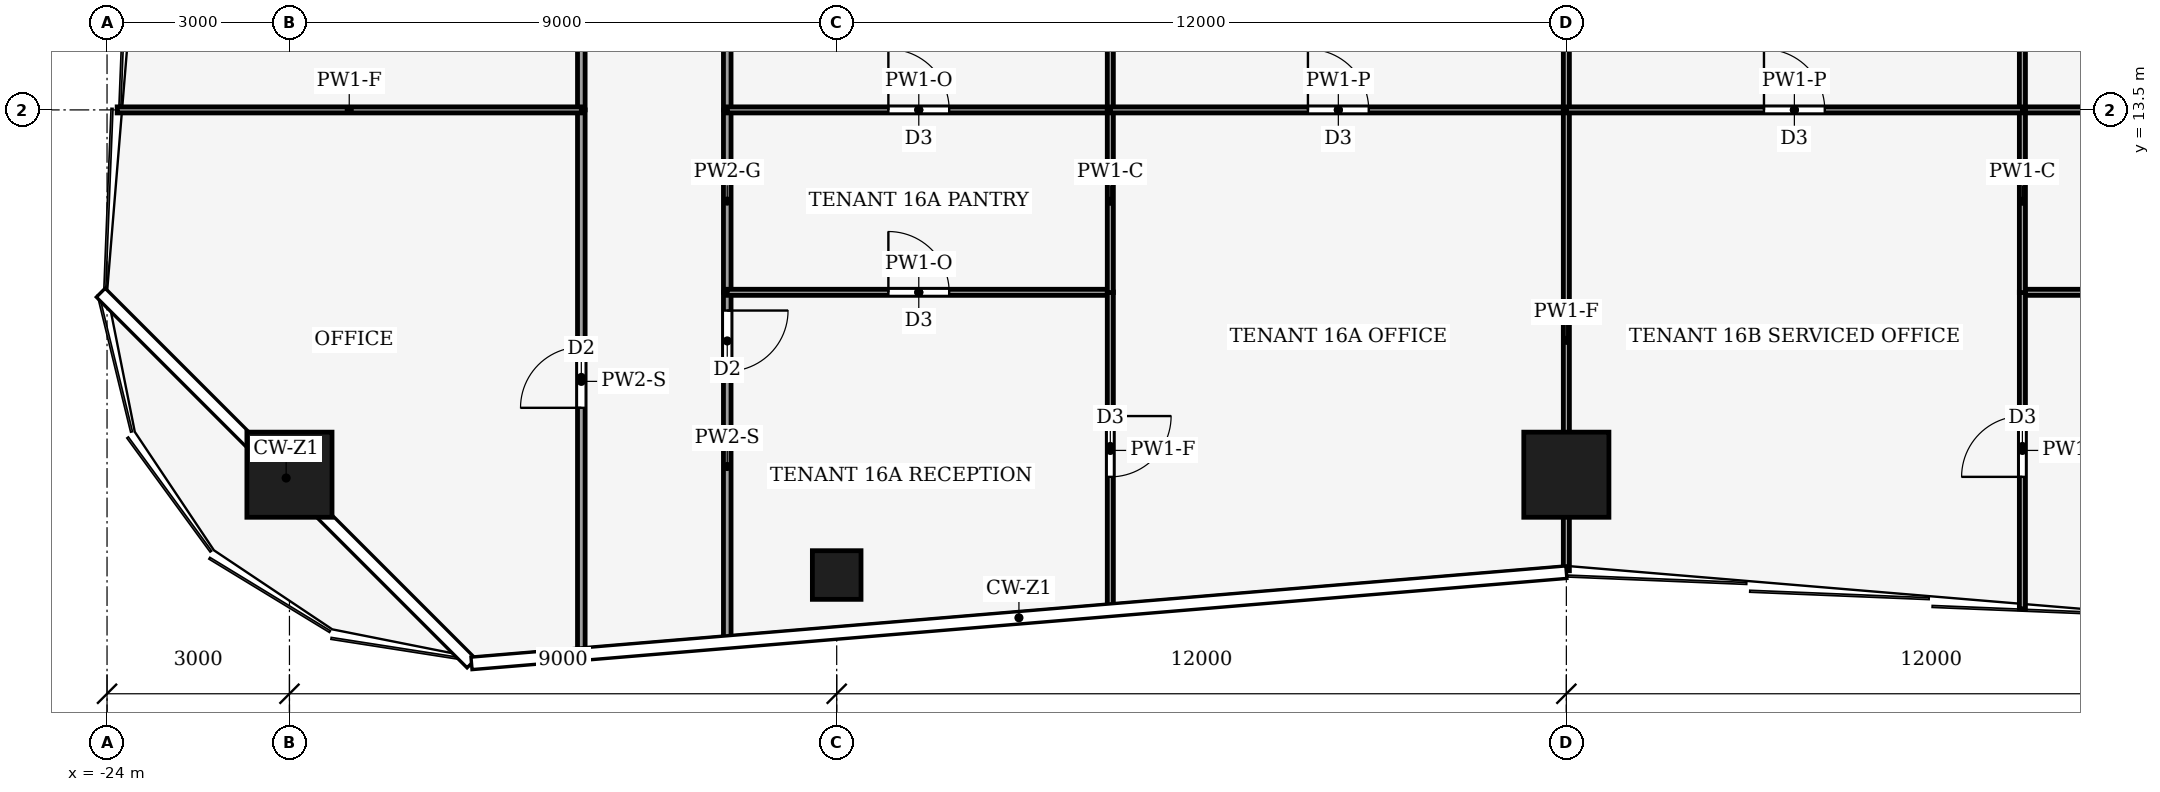
"""IFC4 building model, lengths in metres.
Left out: names, types, materials, properties, quantities, classifications, styles, units other than length and angle.
Written with IfcOpenShell. Run it as: python <this file> out.ifc"""

import sys

from ifc_helpers import new_model, si_unit, direction, frame, frame_2d, origin, origin_2d, place, context, subcontext, project, spatial, rectangle, hollow_rectangle, extrude, element, fill, save


model = new_model("IFC4")
c1 = context("Model", 3, precision=1e-05, world=origin(), true_north=direction((0.0, 1.0)))
c2 = subcontext(c1, "Body", "Model", "MODEL_VIEW")
j1 = project(units=[si_unit("LENGTHUNIT", "METRE"), si_unit("PLANEANGLEUNIT", "RADIAN")], contexts=[c1])
p1 = place(None, origin())
s1 = spatial("IfcSite", under=j1, at=p1, CompositionType="ELEMENT")
p2 = place(p1, origin())
s2 = spatial("IfcBuilding", under=s1, at=p2, CompositionType="ELEMENT")
p3 = place(p2, frame((0.0, 0.0, 74.0)))
s3 = spatial("IfcBuildingStorey", under=s2, at=p3, CompositionType="ELEMENT", Elevation=74.0)
for number, where, z_axis, x_axis in (
    (1, (0.0, 7.5, 0.0), (0.0, 0.0, 1.0), (1.0, 0.0, 0.0)),
    (2, (-21.0, 7.5, 0.0), (0.0, 0.0, 1.0), (1.0, 0.0, 0.0)),
):
    element("IfcColumn", number, at=place(p3, frame(where, z_axis=z_axis, x_axis=x_axis)), inside=s3, PredefinedType="COLUMN", context=c2, shape_type="SweptSolid", body=[
        extrude(hollow_rectangle(XDim=1.4, YDim=1.4, WallThickness=0.08, at=origin_2d()), origin(), (0.0, 0.0, 1.0), 4.0),
    ])
p4 = place(p3, frame((-12.0, 5.85, 0.0), z_axis=(0.0, 0.0, 1.0), x_axis=(1.0, 0.0, 0.0)))
e3 = element("IfcColumn", 3, at=p4, inside=s3, PredefinedType="COLUMN", context=c2, shape_type="SweptSolid", body=[
    extrude(hollow_rectangle(XDim=0.8, YDim=0.8, WallThickness=0.04, at=origin_2d()), origin(), (0.0, 0.0, 1.0), 4.0),
])
p5 = place(p3, frame((-16.2, 4.57, 0.0), z_axis=(0.0, 0.0, 1.0), x_axis=(0.0, 1.0, 0.0)))
e4 = element("IfcWall", 4, at=p5, inside=s3, PredefinedType="PARTITIONING", context=c2, shape_type="SweptSolid", body=[
    extrude(rectangle(XDim=8.93, YDim=0.125, at=frame_2d((4.465, 0.0))), origin(), (0.0, 0.0, 1.0), 3.04),
])
p6 = place(p5, frame((4.03, 0.0, 0.0)))
e5 = element("IfcOpeningElement", 5, at=p6, cuts=e4, PredefinedType="OPENING", context=c2, shape_type="SweptSolid", body=[
    extrude(rectangle(XDim=1.0, YDim=2.1, at=frame_2d((0.5, 1.05))), frame((0.0, 0.073, 0.0), z_axis=(0.0, -1.0, 0.0), x_axis=(1.0, 0.0, 0.0)), (0.0, 0.0, 1.0), 0.145),
])
p7 = place(p3, frame((-16.2, 13.5, 0.0), z_axis=(0.0, 0.0, 1.0), x_axis=(0.0, 1.0, 0.0)))
e6 = element("IfcWall", 6, at=p7, inside=s3, PredefinedType="PARTITIONING", context=c2, shape_type="SweptSolid", body=[
    extrude(rectangle(XDim=6.0, YDim=0.125, at=frame_2d((3.0, 0.0))), origin(), (0.0, 0.0, 1.0), 3.14),
])
p8 = place(p7, frame((2.5, 0.0, 0.0)))
e7 = element("IfcOpeningElement", 7, at=p8, cuts=e6, PredefinedType="OPENING", context=c2, shape_type="SweptSolid", body=[
    extrude(rectangle(XDim=1.0, YDim=2.1, at=frame_2d((0.5, 1.05))), frame((0.0, 0.073, 0.0), z_axis=(0.0, -1.0, 0.0), x_axis=(1.0, 0.0, 0.0)), (0.0, 0.0, 1.0), 0.145),
])
p9 = place(p3, frame((-13.8, 10.5, 0.0), z_axis=(0.0, 0.0, 1.0), x_axis=(0.0, -1.0, 0.0)))
e8 = element("IfcWall", 8, at=p9, inside=s3, PredefinedType="PARTITIONING", context=c2, shape_type="SweptSolid", body=[
    extrude(rectangle(XDim=5.73, YDim=0.125, at=frame_2d((2.865, 0.0))), origin(), (0.0, 0.0, 1.0), 3.04),
])
p10 = place(p9, frame((0.3, 0.0, 0.0)))
e9 = element("IfcOpeningElement", 9, at=p10, cuts=e8, PredefinedType="OPENING", context=c2, shape_type="SweptSolid", body=[
    extrude(rectangle(XDim=1.0, YDim=2.1, at=frame_2d((0.5, 1.05))), frame((0.0, 0.073, 0.0), z_axis=(0.0, -1.0, 0.0), x_axis=(1.0, 0.0, 0.0)), (0.0, 0.0, 1.0), 0.145),
])
p11 = place(p3, frame((-13.8, 10.5, 0.0), z_axis=(0.0, 0.0, 1.0), x_axis=(0.0, 1.0, 0.0)))
e10 = element("IfcWall", 10, at=p11, inside=s3, PredefinedType="PARTITIONING", context=c2, shape_type="SweptSolid", body=[
    extrude(rectangle(XDim=3.0, YDim=0.125, at=frame_2d((1.5, 0.0))), origin(), (0.0, 0.0, 1.0), 3.87),
])
p12 = place(p3, frame((-13.8, 13.5, 0.0), z_axis=(0.0, 0.0, 1.0), x_axis=(0.0, 1.0, 0.0)))
e11 = element("IfcWall", 11, at=p12, inside=s3, PredefinedType="PARTITIONING", context=c2, shape_type="SweptSolid", body=[
    extrude(rectangle(XDim=3.7, YDim=0.125, at=frame_2d((1.85, 0.0))), origin(), (0.0, 0.0, 1.0), 3.14),
])
p13 = place(p3, frame((-16.2, 13.5, 0.0), z_axis=(0.0, 0.0, 1.0), x_axis=(-1.0, 0.0, 0.0)))
e12 = element("IfcWall", 12, at=p13, inside=s3, PredefinedType="PARTITIONING", context=c2, shape_type="SweptSolid", body=[
    extrude(rectangle(XDim=7.634, YDim=0.1, at=frame_2d((3.817, 0.0))), origin(), (0.0, 0.0, 1.0), 3.04),
])
p14 = place(p3, frame((-13.8, 10.5, 0.0), z_axis=(0.0, 0.0, 1.0), x_axis=(1.0, 0.0, 0.0)))
e13 = element("IfcWall", 13, at=p14, inside=s3, PredefinedType="PARTITIONING", context=c2, shape_type="SweptSolid", body=[
    extrude(rectangle(XDim=6.3, YDim=0.1, at=frame_2d((3.15, 0.0))), origin(), (0.0, 0.0, 1.0), 3.39),
])
p15 = place(p14, frame((2.65, 0.0, 0.0)))
e14 = element("IfcOpeningElement", 14, at=p15, cuts=e13, PredefinedType="OPENING", context=c2, shape_type="SweptSolid", body=[
    extrude(rectangle(XDim=1.0, YDim=2.1, at=frame_2d((0.5, 1.05))), frame((0.0, 0.06, 0.0), z_axis=(0.0, -1.0, 0.0), x_axis=(1.0, 0.0, 0.0)), (0.0, 0.0, 1.0), 0.12),
])
p16 = place(p3, frame((-7.5, 10.504, 0.0), z_axis=(0.0, 0.0, 1.0), x_axis=(0.0, -1.0, 0.0)))
e15 = element("IfcWall", 15, at=p16, inside=s3, PredefinedType="PARTITIONING", context=c2, shape_type="SweptSolid", body=[
    extrude(rectangle(XDim=5.209, YDim=0.1, at=frame_2d((2.604, 0.0))), origin(), (0.0, 0.0, 1.0), 3.04),
])
p17 = place(p16, frame((2.039, 0.0, 0.0)))
e16 = element("IfcOpeningElement", 16, at=p17, cuts=e15, PredefinedType="OPENING", context=c2, shape_type="SweptSolid", body=[
    extrude(rectangle(XDim=1.0, YDim=2.1, at=frame_2d((0.5, 1.05))), frame((0.0, 0.06, 0.0), z_axis=(0.0, -1.0, 0.0), x_axis=(1.0, 0.0, 0.0)), (0.0, 0.0, 1.0), 0.12),
])
p18 = place(p3, frame((-13.8, 13.5, 0.0), z_axis=(0.0, 0.0, 1.0), x_axis=(1.0, 0.0, 0.0)))
e17 = element("IfcWall", 17, at=p18, inside=s3, PredefinedType="PARTITIONING", context=c2, shape_type="SweptSolid", body=[
    extrude(rectangle(XDim=6.3, YDim=0.1, at=frame_2d((3.15, 0.0))), origin(), (0.0, 0.0, 1.0), 3.39),
])
p19 = place(p18, frame((2.65, 0.0, 0.0)))
e18 = element("IfcOpeningElement", 18, at=p19, cuts=e17, PredefinedType="OPENING", context=c2, shape_type="SweptSolid", body=[
    extrude(rectangle(XDim=1.0, YDim=2.1, at=frame_2d((0.5, 1.05))), frame((0.0, 0.06, 0.0), z_axis=(0.0, -1.0, 0.0), x_axis=(1.0, 0.0, 0.0)), (0.0, 0.0, 1.0), 0.12),
])
p20 = place(p3, frame((-7.5, 10.496, 0.0), z_axis=(0.0, 0.0, 1.0), x_axis=(0.0, 1.0, 0.0)))
e19 = element("IfcWall", 19, at=p20, inside=s3, PredefinedType="PARTITIONING", context=c2, shape_type="SweptSolid", body=[
    extrude(rectangle(XDim=3.004, YDim=0.1, at=frame_2d((1.502, 0.0))), origin(), (0.0, 0.0, 1.0), 3.87),
])
p21 = place(p3, frame((-7.5, 13.5, 0.0), z_axis=(0.0, 0.0, 1.0), x_axis=(0.0, 1.0, 0.0)))
e20 = element("IfcWall", 20, at=p21, inside=s3, PredefinedType="PARTITIONING", context=c2, shape_type="SweptSolid", body=[
    extrude(rectangle(XDim=3.7, YDim=0.1, at=frame_2d((1.85, 0.0))), origin(), (0.0, 0.0, 1.0), 3.87),
])
p22 = place(p3, frame((-7.5, 13.5, 0.0), z_axis=(0.0, 0.0, 1.0), x_axis=(1.0, 0.0, 0.0)))
e21 = element("IfcWall", 21, at=p22, inside=s3, PredefinedType="PARTITIONING", context=c2, shape_type="SweptSolid", body=[
    extrude(rectangle(XDim=7.5, YDim=0.1, at=frame_2d((3.75, 0.0))), origin(), (0.0, 0.0, 1.0), 3.44),
])
p23 = place(p22, frame((3.25, 0.0, 0.0)))
e22 = element("IfcOpeningElement", 22, at=p23, cuts=e21, PredefinedType="OPENING", context=c2, shape_type="SweptSolid", body=[
    extrude(rectangle(XDim=1.0, YDim=2.1, at=frame_2d((0.5, 1.05))), frame((0.0, 0.06, 0.0), z_axis=(0.0, -1.0, 0.0), x_axis=(1.0, 0.0, 0.0)), (0.0, 0.0, 1.0), 0.12),
])
p24 = place(p3, frame((0.0, 5.92, 0.0), z_axis=(0.0, 0.0, 1.0), x_axis=(0.0, 1.0, 0.0)))
e23 = element("IfcWall", 23, at=p24, inside=s3, PredefinedType="PARTITIONING", context=c2, shape_type="SweptSolid", body=[
    extrude(rectangle(XDim=7.58, YDim=0.1, at=frame_2d((3.79, 0.0))), origin(), (0.0, 0.0, 1.0), 3.04),
])
p25 = place(p3, frame((0.0, 13.5, 0.0), z_axis=(0.0, 0.0, 1.0), x_axis=(0.0, 1.0, 0.0)))
e24 = element("IfcWall", 24, at=p25, inside=s3, PredefinedType="PARTITIONING", context=c2, shape_type="SweptSolid", body=[
    extrude(rectangle(XDim=3.7, YDim=0.1, at=frame_2d((1.85, 0.0))), origin(), (0.0, 0.0, 1.0), 3.48),
])
p26 = place(p3, frame((7.5, 10.5, 0.0), z_axis=(0.0, 0.0, 1.0), x_axis=(1.0, 0.0, 0.0)))
e25 = element("IfcWall", 25, at=p26, inside=s3, PredefinedType="PARTITIONING", context=c2, shape_type="SweptSolid", body=[
    extrude(rectangle(XDim=6.3, YDim=0.1, at=frame_2d((3.15, 0.0))), origin(), (0.0, 0.0, 1.0), 3.39),
])
p27 = place(p26, frame((2.65, 0.0, 0.0)))
e26 = element("IfcOpeningElement", 26, at=p27, cuts=e25, PredefinedType="OPENING", context=c2, shape_type="SweptSolid", body=[
    extrude(rectangle(XDim=1.0, YDim=2.1, at=frame_2d((0.5, 1.05))), frame((0.0, 0.06, 0.0), z_axis=(0.0, -1.0, 0.0), x_axis=(1.0, 0.0, 0.0)), (0.0, 0.0, 1.0), 0.12),
])
p28 = place(p3, frame((7.5, 5.295, 0.0), z_axis=(0.0, 0.0, 1.0), x_axis=(0.0, 1.0, 0.0)))
e27 = element("IfcWall", 27, at=p28, inside=s3, PredefinedType="PARTITIONING", context=c2, shape_type="SweptSolid", body=[
    extrude(rectangle(XDim=5.209, YDim=0.1, at=frame_2d((2.604, 0.0))), origin(), (0.0, 0.0, 1.0), 3.04),
])
p29 = place(p28, frame((2.17, 0.0, 0.0)))
e28 = element("IfcOpeningElement", 28, at=p29, cuts=e27, PredefinedType="OPENING", context=c2, shape_type="SweptSolid", body=[
    extrude(rectangle(XDim=1.0, YDim=2.1, at=frame_2d((0.5, 1.05))), frame((0.0, 0.06, 0.0), z_axis=(0.0, -1.0, 0.0), x_axis=(1.0, 0.0, 0.0)), (0.0, 0.0, 1.0), 0.12),
])
p30 = place(p3, frame((13.8, 13.5, 0.0), z_axis=(0.0, 0.0, 1.0), x_axis=(-1.0, 0.0, 0.0)))
e29 = element("IfcWall", 29, at=p30, inside=s3, PredefinedType="PARTITIONING", context=c2, shape_type="SweptSolid", body=[
    extrude(rectangle(XDim=6.3, YDim=0.1, at=frame_2d((3.15, 0.0))), origin(), (0.0, 0.0, 1.0), 3.39),
])
p31 = place(p3, frame((7.5, 13.5, 0.0), z_axis=(0.0, 0.0, 1.0), x_axis=(0.0, -1.0, 0.0)))
e30 = element("IfcWall", 30, at=p31, inside=s3, PredefinedType="PARTITIONING", context=c2, shape_type="SweptSolid", body=[
    extrude(rectangle(XDim=3.004, YDim=0.1, at=frame_2d((1.502, 0.0))), origin(), (0.0, 0.0, 1.0), 3.87),
])
p32 = place(p3, frame((7.5, 17.2, 0.0), z_axis=(0.0, 0.0, 1.0), x_axis=(0.0, -1.0, 0.0)))
e31 = element("IfcWall", 31, at=p32, inside=s3, PredefinedType="PARTITIONING", context=c2, shape_type="SweptSolid", body=[
    extrude(rectangle(XDim=3.7, YDim=0.1, at=frame_2d((1.85, 0.0))), origin(), (0.0, 0.0, 1.0), 3.87),
])
p33 = place(p3, frame((0.0, 13.5, 0.0), z_axis=(0.0, 0.0, 1.0), x_axis=(1.0, 0.0, 0.0)))
e32 = element("IfcWall", 32, at=p33, inside=s3, PredefinedType="PARTITIONING", context=c2, shape_type="SweptSolid", body=[
    extrude(rectangle(XDim=7.5, YDim=0.1, at=frame_2d((3.75, 0.0))), origin(), (0.0, 0.0, 1.0), 3.44),
])
p34 = place(p33, frame((3.25, 0.0, 0.0)))
e33 = element("IfcOpeningElement", 33, at=p34, cuts=e32, PredefinedType="OPENING", context=c2, shape_type="SweptSolid", body=[
    extrude(rectangle(XDim=1.0, YDim=2.1, at=frame_2d((0.5, 1.05))), frame((0.0, 0.06, 0.0), z_axis=(0.0, -1.0, 0.0), x_axis=(1.0, 0.0, 0.0)), (0.0, 0.0, 1.0), 0.12),
])
p35 = place(p6, origin())
e34 = element("IfcDoor", 34, at=p35, inside=s3, OperationType="SINGLE_SWING_RIGHT", PredefinedType="DOOR", context=c2, shape_type="SweptSolid", body=[
    extrude(rectangle(XDim=1.0, YDim=2.1, at=frame_2d((0.5, 1.05))), frame((0.0, 0.025, 0.0), z_axis=(0.0, -1.0, 0.0), x_axis=(1.0, 0.0, 0.0)), (0.0, 0.0, 1.0), 0.05),
])
fill(e5, e34)
p36 = place(p10, origin())
e35 = element("IfcDoor", 35, at=p36, inside=s3, OperationType="SINGLE_SWING_LEFT", PredefinedType="DOOR", context=c2, shape_type="SweptSolid", body=[
    extrude(rectangle(XDim=1.0, YDim=2.1, at=frame_2d((0.5, 1.05))), frame((0.0, 0.025, 0.0), z_axis=(0.0, -1.0, 0.0), x_axis=(1.0, 0.0, 0.0)), (0.0, 0.0, 1.0), 0.05),
])
fill(e9, e35)
p37 = place(p15, origin())
e36 = element("IfcDoor", 36, at=p37, inside=s3, OperationType="SINGLE_SWING_LEFT", PredefinedType="DOOR", context=c2, shape_type="SweptSolid", body=[
    extrude(rectangle(XDim=1.0, YDim=2.1, at=frame_2d((0.5, 1.05))), frame((0.0, 0.025, 0.0), z_axis=(0.0, -1.0, 0.0), x_axis=(1.0, 0.0, 0.0)), (0.0, 0.0, 1.0), 0.05),
])
fill(e14, e36)
p38 = place(p17, origin())
e37 = element("IfcDoor", 37, at=p38, inside=s3, OperationType="SINGLE_SWING_LEFT", PredefinedType="DOOR", context=c2, shape_type="SweptSolid", body=[
    extrude(rectangle(XDim=1.0, YDim=2.1, at=frame_2d((0.5, 1.05))), frame((0.0, 0.025, 0.0), z_axis=(0.0, -1.0, 0.0), x_axis=(1.0, 0.0, 0.0)), (0.0, 0.0, 1.0), 0.05),
])
fill(e16, e37)
p39 = place(p19, origin())
e38 = element("IfcDoor", 38, at=p39, inside=s3, OperationType="SINGLE_SWING_LEFT", PredefinedType="DOOR", context=c2, shape_type="SweptSolid", body=[
    extrude(rectangle(XDim=1.0, YDim=2.1, at=frame_2d((0.5, 1.05))), frame((0.0, 0.025, 0.0), z_axis=(0.0, -1.0, 0.0), x_axis=(1.0, 0.0, 0.0)), (0.0, 0.0, 1.0), 0.05),
])
fill(e18, e38)
p40 = place(p23, origin())
e39 = element("IfcDoor", 39, at=p40, inside=s3, OperationType="SINGLE_SWING_RIGHT", PredefinedType="DOOR", context=c2, shape_type="SweptSolid", body=[
    extrude(rectangle(XDim=1.0, YDim=2.1, at=frame_2d((0.5, 1.05))), frame((0.0, 0.025, 0.0), z_axis=(0.0, -1.0, 0.0), x_axis=(1.0, 0.0, 0.0)), (0.0, 0.0, 1.0), 0.05),
])
fill(e22, e39)
p41 = place(p29, origin())
e40 = element("IfcDoor", 40, at=p41, inside=s3, OperationType="SINGLE_SWING_RIGHT", PredefinedType="DOOR", context=c2, shape_type="SweptSolid", body=[
    extrude(rectangle(XDim=1.0, YDim=2.1, at=frame_2d((0.5, 1.05))), frame((0.0, 0.025, 0.0), z_axis=(0.0, -1.0, 0.0), x_axis=(1.0, 0.0, 0.0)), (0.0, 0.0, 1.0), 0.05),
])
fill(e28, e40)
p42 = place(p34, origin())
e41 = element("IfcDoor", 41, at=p42, inside=s3, OperationType="SINGLE_SWING_LEFT", PredefinedType="DOOR", context=c2, shape_type="SweptSolid", body=[
    extrude(rectangle(XDim=1.0, YDim=2.1, at=frame_2d((0.5, 1.05))), frame((0.0, 0.025, 0.0), z_axis=(0.0, -1.0, 0.0), x_axis=(1.0, 0.0, 0.0)), (0.0, 0.0, 1.0), 0.05),
])
fill(e33, e41)
save(model, sys.argv[1])
